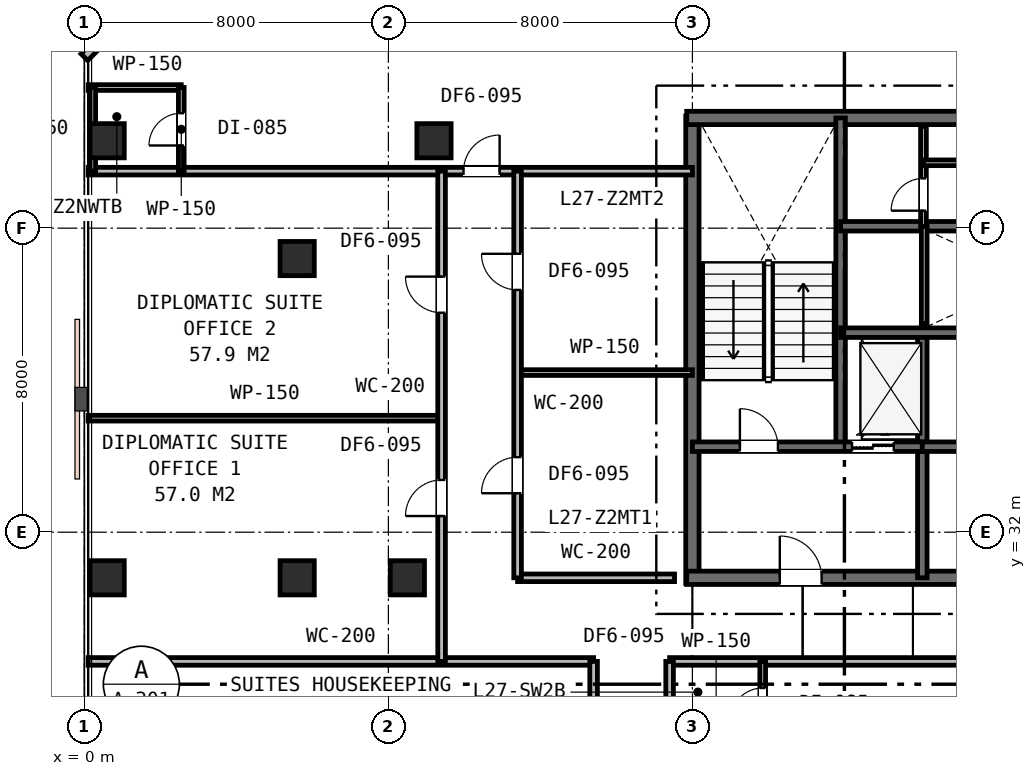
"""IFC4 building model, lengths in metres.
Left out: names, types, materials, properties, quantities, classifications, styles, units other than length and angle.
Written with IfcOpenShell. Run it as: python <this file> out.ifc"""

import sys

from ifc_helpers import new_model, si_unit, direction, frame, frame_2d, origin, origin_2d, place, context, subcontext, project, spatial, rectangle, extrude, element, fill, save


model = new_model("IFC4")
c1 = context("Model", 3, precision=1e-05, world=origin(), true_north=direction((0.0, 1.0)))
c2 = subcontext(c1, "Body", "Model", "MODEL_VIEW")
j1 = project(units=[si_unit("LENGTHUNIT", "METRE"), si_unit("PLANEANGLEUNIT", "RADIAN")], contexts=[c1])
p1 = place(None, origin())
s1 = spatial("IfcSite", under=j1, at=p1, CompositionType="ELEMENT")
p2 = place(p1, origin())
s2 = spatial("IfcBuilding", under=s1, at=p2, CompositionType="ELEMENT")
p3 = place(p2, frame((0.0, 0.0, 108.0)))
s3 = spatial("IfcBuildingStorey", under=s2, at=p3, CompositionType="ELEMENT", Elevation=108.0)
p4 = place(p3, frame((16.0, 30.65, 0.0), z_axis=(0.0, 0.0, 1.0), x_axis=(0.0, 1.0, 0.0)))
e1 = element("IfcWall", 1, at=p4, inside=s3, PredefinedType="SHEAR", context=c2, shape_type="SweptSolid", body=[
    extrude(rectangle(XDim=12.3, YDim=0.35, at=frame_2d((6.15, 0.0))), origin(), (0.0, 0.0, 1.0), 3.6),
])
p5 = place(p3, frame((15.85, 42.9, 0.0), z_axis=(0.0, 0.0, 1.0), x_axis=(1.0, 0.0, 0.0)))
e2 = element("IfcWall", 2, at=p5, inside=s3, PredefinedType="SHEAR", context=c2, shape_type="SweptSolid", body=[
    extrude(rectangle(XDim=24.3, YDim=0.35, at=frame_2d((12.15, 0.0))), origin(), (0.0, 0.0, 1.0), 3.6),
])
p6 = place(p3, frame((15.85, 30.8, 0.0), z_axis=(0.0, 0.0, 1.0), x_axis=(1.0, 0.0, 0.0)))
e3 = element("IfcWall", 3, at=p6, inside=s3, PredefinedType="SHEAR", context=c2, shape_type="SweptSolid", body=[
    extrude(rectangle(XDim=11.2, YDim=0.35, at=frame_2d((5.6, 0.0))), origin(), (0.0, 0.0, 1.0), 3.6),
])
p7 = place(p6, frame((2.45, 0.0, 0.0)))
e4 = element("IfcOpeningElement", 4, at=p7, cuts=e3, PredefinedType="OPENING", context=c2, shape_type="SweptSolid", body=[
    extrude(rectangle(XDim=1.1, YDim=2.15, at=frame_2d((0.55, 1.075))), frame((0.0, 0.185, 0.0), z_axis=(0.0, -1.0, 0.0), x_axis=(1.0, 0.0, 0.0)), (0.0, 0.0, 1.0), 0.37),
])
p8 = place(p3, frame((19.9, 34.25, 0.0), z_axis=(0.0, 0.0, 1.0), x_axis=(0.0, 1.0, 0.0)))
e5 = element("IfcWall", 5, at=p8, inside=s3, PredefinedType="SHEAR", context=c2, shape_type="SweptSolid", body=[
    extrude(rectangle(XDim=8.65, YDim=0.25, at=frame_2d((4.325, 0.0))), origin(), (0.0, 0.0, 1.0), 3.6),
])
p9 = place(p3, frame((22.05, 30.8, 0.0), z_axis=(0.0, 0.0, 1.0), x_axis=(0.0, 1.0, 0.0)))
e6 = element("IfcWall", 6, at=p9, inside=s3, PredefinedType="SHEAR", context=c2, shape_type="SweptSolid", body=[
    extrude(rectangle(XDim=6.45, YDim=0.25, at=frame_2d((3.225, 0.0))), origin(), (0.0, 0.0, 1.0), 3.6),
])
p10 = place(p3, frame((16.0, 34.25, 0.0), z_axis=(0.0, 0.0, 1.0), x_axis=(1.0, 0.0, 0.0)))
e7 = element("IfcWall", 7, at=p10, inside=s3, PredefinedType="SHEAR", context=c2, shape_type="SweptSolid", body=[
    extrude(rectangle(XDim=6.05, YDim=0.25, at=frame_2d((3.025, 0.0))), origin(), (0.0, 0.0, 1.0), 3.6),
])
p11 = place(p10, frame((1.25, 0.0, 0.0)))
e8 = element("IfcOpeningElement", 8, at=p11, cuts=e7, PredefinedType="OPENING", context=c2, shape_type="SweptSolid", body=[
    extrude(rectangle(XDim=1.0, YDim=2.15, at=frame_2d((0.5, 1.075))), frame((0.0, 0.135, 0.0), z_axis=(0.0, -1.0, 0.0), x_axis=(1.0, 0.0, 0.0)), (0.0, 0.0, 1.0), 0.27),
])
p12 = place(p10, frame((4.2, 0.0, 0.0)))
e9 = element("IfcOpeningElement", 9, at=p12, cuts=e7, PredefinedType="OPENING", context=c2, shape_type="SweptSolid", body=[
    extrude(rectangle(XDim=1.1, YDim=2.15, at=frame_2d((0.55, 1.075))), frame((0.0, 0.135, 0.0), z_axis=(0.0, -1.0, 0.0), x_axis=(1.0, 0.0, 0.0)), (0.0, 0.0, 1.0), 0.27),
])
p13 = place(p3, frame((22.05, 34.25, 0.0), z_axis=(0.0, 0.0, 1.0), x_axis=(1.0, 0.0, 0.0)))
e10 = element("IfcWall", 10, at=p13, inside=s3, PredefinedType="SHEAR", context=c2, shape_type="SweptSolid", body=[
    extrude(rectangle(XDim=5.0, YDim=0.25, at=frame_2d((2.5, 0.0))), origin(), (0.0, 0.0, 1.0), 3.6),
])
p14 = place(p13, frame((1.95, 0.0, 0.0)))
e11 = element("IfcOpeningElement", 11, at=p14, cuts=e10, PredefinedType="OPENING", context=c2, shape_type="SweptSolid", body=[
    extrude(rectangle(XDim=1.0, YDim=2.15, at=frame_2d((0.5, 1.075))), frame((0.0, 0.135, 0.0), z_axis=(0.0, -1.0, 0.0), x_axis=(1.0, 0.0, 0.0)), (0.0, 0.0, 1.0), 0.27),
])
p15 = place(p3, frame((19.9, 37.25, 0.0), z_axis=(0.0, 0.0, 1.0), x_axis=(1.0, 0.0, 0.0)))
e12 = element("IfcWall", 12, at=p15, inside=s3, PredefinedType="SHEAR", context=c2, shape_type="SweptSolid", body=[
    extrude(rectangle(XDim=16.2, YDim=0.25, at=frame_2d((8.1, 0.0))), origin(), (0.0, 0.0, 1.0), 3.6),
])
p16 = place(p15, frame((12.55, 0.0, 0.0)))
e13 = element("IfcOpeningElement", 13, at=p16, cuts=e12, PredefinedType="OPENING", context=c2, shape_type="SweptSolid", body=[
    extrude(rectangle(XDim=0.9, YDim=2.15, at=frame_2d((0.45, 1.075))), frame((0.0, 0.135, 0.0), z_axis=(0.0, -1.0, 0.0), x_axis=(1.0, 0.0, 0.0)), (0.0, 0.0, 1.0), 0.27),
])
p17 = place(p3, frame((19.9, 40.05, 0.0), z_axis=(0.0, 0.0, 1.0), x_axis=(1.0, 0.0, 0.0)))
e14 = element("IfcWall", 14, at=p17, inside=s3, PredefinedType="SHEAR", context=c2, shape_type="SweptSolid", body=[
    extrude(rectangle(XDim=12.05, YDim=0.25, at=frame_2d((6.025, 0.0))), origin(), (0.0, 0.0, 1.0), 3.6),
])
for number, where, z_axis, x_axis in (
    (15, (5.6, 30.8, 0.0), (0.0, 0.0, 1.0), (1.0, 0.0, 0.0)),
    (16, (5.6, 39.2, 0.0), (0.0, 0.0, 1.0), (1.0, 0.0, 0.0)),
    (17, (8.5, 30.8, 0.0), (0.0, 0.0, 1.0), (1.0, 0.0, 0.0)),
    (18, (9.2, 42.3, 0.0), (0.0, 0.0, 1.0), (1.0, 0.0, 0.0)),
    (19, (0.6, 30.8, 0.0), (0.0, 0.0, 1.0), (1.0, 0.0, 0.0)),
    (20, (0.6, 42.3, 0.0), (0.0, 0.0, 1.0), (1.0, 0.0, 0.0)),
):
    element("IfcColumn", number, at=place(p3, frame(where, z_axis=z_axis, x_axis=x_axis)), inside=s3, PredefinedType="COLUMN", context=c2, shape_type="SweptSolid", body=[
        extrude(rectangle(XDim=0.9, YDim=0.9, at=origin_2d()), origin(), (0.0, 0.0, 1.0), 3.6),
    ])
p18 = place(p3, frame((3.5, 48.0, 0.0), z_axis=(0.0, 0.0, 1.0), x_axis=(-0.707106781187, -0.707106781187, 0.0)))
e21 = element("IfcWall", 21, at=p18, inside=s3, PredefinedType="STANDARD", context=c2, shape_type="SweptSolid", body=[
    extrude(rectangle(XDim=4.95, YDim=0.25, at=frame_2d((2.475, 0.0))), origin(), (0.0, 0.0, 1.0), 3.33),
])
p19 = place(p18, frame((1.875, 0.0, 0.85)))
e22 = element("IfcOpeningElement", 22, at=p19, cuts=e21, PredefinedType="OPENING", context=c2, shape_type="SweptSolid", body=[
    extrude(rectangle(XDim=1.2, YDim=1.6, at=frame_2d((0.6, 0.8))), frame((0.0, 0.135, 0.0), z_axis=(0.0, -1.0, 0.0), x_axis=(1.0, 0.0, 0.0)), (0.0, 0.0, 1.0), 0.27),
])
p20 = place(p3, frame((22.1, 37.49, 0.0), z_axis=(0.0, 0.0, 1.0), x_axis=(0.0, 1.0, 0.0)))
e23 = element("IfcWall", 23, at=p20, inside=s3, PredefinedType="PLUMBINGWALL", context=c2, shape_type="SweptSolid", body=[
    extrude(rectangle(XDim=2.56, YDim=0.15, at=frame_2d((1.28, 0.0))), origin(), (0.0, 0.0, 1.0), 3.33),
])
p21 = place(p3, frame((22.08, 40.05, 0.0), z_axis=(0.0, 0.0, 1.0), x_axis=(0.0, 1.0, 0.0)))
e24 = element("IfcWall", 24, at=p21, inside=s3, PredefinedType="PARTITIONING", context=c2, shape_type="SweptSolid", body=[
    extrude(rectangle(XDim=2.63, YDim=0.15, at=frame_2d((1.315, 0.0))), origin(), (0.0, 0.0, 1.0), 3.33),
])
p22 = place(p21, frame((0.41, 0.0, 0.0)))
e25 = element("IfcOpeningElement", 25, at=p22, cuts=e24, PredefinedType="OPENING", context=c2, shape_type="SweptSolid", body=[
    extrude(rectangle(XDim=0.85, YDim=2.15, at=frame_2d((0.425, 1.075))), frame((0.0, 0.085, 0.0), z_axis=(0.0, -1.0, 0.0), x_axis=(1.0, 0.0, 0.0)), (0.0, 0.0, 1.0), 0.17),
])
p23 = place(p3, frame((22.08, 41.72, 0.0), z_axis=(0.0, 0.0, 1.0), x_axis=(1.0, 0.0, 0.0)))
e26 = element("IfcWall", 26, at=p23, inside=s3, PredefinedType="PARTITIONING", context=c2, shape_type="SweptSolid", body=[
    extrude(rectangle(XDim=11.97, YDim=0.15, at=frame_2d((5.985, 0.0))), origin(), (0.0, 0.0, 1.0), 3.33),
])
p24 = place(p23, frame((5.535, 0.0, 0.0)))
e27 = element("IfcOpeningElement", 27, at=p24, cuts=e26, PredefinedType="OPENING", context=c2, shape_type="SweptSolid", body=[
    extrude(rectangle(XDim=0.9, YDim=2.15, at=frame_2d((0.45, 1.075))), frame((0.0, 0.085, 0.0), z_axis=(0.0, -1.0, 0.0), x_axis=(1.0, 0.0, 0.0)), (0.0, 0.0, 1.0), 0.17),
])
p25 = place(p3, frame((0.1, 28.6, 0.0), z_axis=(0.0, 0.0, 1.0), x_axis=(1.0, 0.0, 0.0)))
e28 = element("IfcWall", 28, at=p25, inside=s3, PredefinedType="PARTITIONING", context=c2, shape_type="SweptSolid", body=[
    extrude(rectangle(XDim=13.3, YDim=0.2, at=frame_2d((6.65, 0.0))), origin(), (0.0, 0.0, 1.0), 2.87),
])
p26 = place(p3, frame((15.4, 28.6, 0.0), z_axis=(0.0, 0.0, 1.0), x_axis=(1.0, 0.0, 0.0)))
e29 = element("IfcWall", 29, at=p26, inside=s3, PredefinedType="PARTITIONING", context=c2, shape_type="SweptSolid", body=[
    extrude(rectangle(XDim=28.8, YDim=0.2, at=frame_2d((14.4, 0.0))), origin(), (0.0, 0.0, 1.0), 2.87),
])
p27 = place(p26, frame((12.41, 0.0, 0.0)))
e30 = element("IfcOpeningElement", 30, at=p27, cuts=e29, PredefinedType="OPENING", context=c2, shape_type="SweptSolid", body=[
    extrude(rectangle(XDim=0.95, YDim=2.15, at=frame_2d((0.475, 1.075))), frame((0.0, 0.11, 0.0), z_axis=(0.0, -1.0, 0.0), x_axis=(1.0, 0.0, 0.0)), (0.0, 0.0, 1.0), 0.22),
])
p28 = place(p26, frame((22.68, 0.0, 0.0)))
e31 = element("IfcOpeningElement", 31, at=p28, cuts=e29, PredefinedType="OPENING", context=c2, shape_type="SweptSolid", body=[
    extrude(rectangle(XDim=0.95, YDim=2.15, at=frame_2d((0.475, 1.075))), frame((0.0, 0.11, 0.0), z_axis=(0.0, -1.0, 0.0), x_axis=(1.0, 0.0, 0.0)), (0.0, 0.0, 1.0), 0.22),
])
p29 = place(p3, frame((11.4, 30.8, 0.0), z_axis=(0.0, 0.0, 1.0), x_axis=(1.0, 0.0, 0.0)))
e32 = element("IfcWall", 32, at=p29, inside=s3, PredefinedType="PARTITIONING", context=c2, shape_type="SweptSolid", body=[
    extrude(rectangle(XDim=4.13, YDim=0.2, at=frame_2d((2.065, 0.0))), origin(), (0.0, 0.0, 1.0), 2.87),
])
p30 = place(p3, frame((13.4, 10.6, 0.0), z_axis=(0.0, 0.0, 1.0), x_axis=(0.0, 1.0, 0.0)))
e33 = element("IfcWall", 33, at=p30, inside=s3, PredefinedType="PARTITIONING", context=c2, shape_type="SweptSolid", body=[
    extrude(rectangle(XDim=18.0, YDim=0.2, at=frame_2d((9.0, 0.0))), origin(), (0.0, 0.0, 1.0), 2.87),
])
p31 = place(p30, frame((8.425, 0.0, 0.0)))
e34 = element("IfcOpeningElement", 34, at=p31, cuts=e33, PredefinedType="OPENING", context=c2, shape_type="SweptSolid", body=[
    extrude(rectangle(XDim=0.95, YDim=2.15, at=frame_2d((0.475, 1.075))), frame((0.0, 0.11, 0.0), z_axis=(0.0, -1.0, 0.0), x_axis=(1.0, 0.0, 0.0)), (0.0, 0.0, 1.0), 0.22),
])
p32 = place(p30, frame((15.399, 0.0, 0.0)))
e35 = element("IfcOpeningElement", 35, at=p32, cuts=e33, PredefinedType="OPENING", context=c2, shape_type="SweptSolid", body=[
    extrude(rectangle(XDim=0.95, YDim=2.15, at=frame_2d((0.475, 1.075))), frame((0.0, 0.11, 0.0), z_axis=(0.0, -1.0, 0.0), x_axis=(1.0, 0.0, 0.0)), (0.0, 0.0, 1.0), 0.22),
])
p33 = place(p30, frame((3.225, 0.0, 0.0)))
e36 = element("IfcOpeningElement", 36, at=p33, cuts=e33, PredefinedType="OPENING", context=c2, shape_type="SweptSolid", body=[
    extrude(rectangle(XDim=0.95, YDim=2.15, at=frame_2d((0.475, 1.075))), frame((0.0, 0.11, 0.0), z_axis=(0.0, -1.0, 0.0), x_axis=(1.0, 0.0, 0.0)), (0.0, 0.0, 1.0), 0.22),
])
p34 = place(p3, frame((0.1, 41.5, 0.0), z_axis=(0.0, 0.0, 1.0), x_axis=(1.0, 0.0, 0.0)))
e37 = element("IfcWall", 37, at=p34, inside=s3, PredefinedType="PARTITIONING", context=c2, shape_type="SweptSolid", body=[
    extrude(rectangle(XDim=15.9, YDim=0.2, at=frame_2d((7.95, 0.0))), origin(), (0.0, 0.0, 1.0), 2.87),
])
p35 = place(p34, frame((9.877, 0.0, 0.0)))
e38 = element("IfcOpeningElement", 38, at=p35, cuts=e37, PredefinedType="OPENING", context=c2, shape_type="SweptSolid", body=[
    extrude(rectangle(XDim=0.95, YDim=2.15, at=frame_2d((0.475, 1.075))), frame((0.0, 0.11, 0.0), z_axis=(0.0, -1.0, 0.0), x_axis=(1.0, 0.0, 0.0)), (0.0, 0.0, 1.0), 0.22),
])
p36 = place(p3, frame((0.1, 43.7, 0.0), z_axis=(0.0, 0.0, 1.0), x_axis=(1.0, 0.0, 0.0)))
e39 = element("IfcWall", 39, at=p36, inside=s3, PredefinedType="PARTITIONING", context=c2, shape_type="SweptSolid", body=[
    extrude(rectangle(XDim=2.45, YDim=0.15, at=frame_2d((1.225, 0.0))), origin(), (0.0, 0.0, 1.0), 3.33),
])
p37 = place(p3, frame((2.55, 41.5, 0.0), z_axis=(0.0, 0.0, 1.0), x_axis=(0.0, 1.0, 0.0)))
e40 = element("IfcWall", 40, at=p37, inside=s3, PredefinedType="PARTITIONING", context=c2, shape_type="SweptSolid", body=[
    extrude(rectangle(XDim=2.2, YDim=0.15, at=frame_2d((1.1, 0.0))), origin(), (0.0, 0.0, 1.0), 2.87),
])
p38 = place(p37, frame((0.675, 0.0, 0.0)))
e41 = element("IfcOpeningElement", 41, at=p38, cuts=e40, PredefinedType="OPENING", context=c2, shape_type="SweptSolid", body=[
    extrude(rectangle(XDim=0.85, YDim=2.15, at=frame_2d((0.425, 1.075))), frame((0.0, 0.085, 0.0), z_axis=(0.0, -1.0, 0.0), x_axis=(1.0, 0.0, 0.0)), (0.0, 0.0, 1.0), 0.17),
])
p39 = place(p3, frame((0.22, 41.5, 0.0), z_axis=(0.0, 0.0, 1.0), x_axis=(0.0, 1.0, 0.0)))
e42 = element("IfcWall", 42, at=p39, inside=s3, PredefinedType="PARTITIONING", context=c2, shape_type="SweptSolid", body=[
    extrude(rectangle(XDim=2.2, YDim=0.15, at=frame_2d((1.1, 0.0))), origin(), (0.0, 0.0, 1.0), 2.87),
])
p40 = place(p3, frame((0.1, 35.0, 0.0), z_axis=(0.0, 0.0, 1.0), x_axis=(1.0, 0.0, 0.0)))
e43 = element("IfcWall", 43, at=p40, inside=s3, PredefinedType="PARTITIONING", context=c2, shape_type="SweptSolid", body=[
    extrude(rectangle(XDim=9.3, YDim=0.15, at=frame_2d((4.65, 0.0))), origin(), (0.0, 0.0, 1.0), 2.87),
])
p41 = place(p3, frame((11.4, 36.2, 0.0), z_axis=(0.0, 0.0, 1.0), x_axis=(1.0, 0.0, 0.0)))
e44 = element("IfcWall", 44, at=p41, inside=s3, PredefinedType="PARTITIONING", context=c2, shape_type="SweptSolid", body=[
    extrude(rectangle(XDim=4.6, YDim=0.15, at=frame_2d((2.3, 0.0))), origin(), (0.0, 0.0, 1.0), 3.33),
])
p42 = place(p3, frame((9.4, 28.6, 0.0), z_axis=(0.0, 0.0, 1.0), x_axis=(0.0, 1.0, 0.0)))
e45 = element("IfcWall", 45, at=p42, inside=s3, PredefinedType="PARTITIONING", context=c2, shape_type="SweptSolid", body=[
    extrude(rectangle(XDim=12.9, YDim=0.2, at=frame_2d((6.45, 0.0))), origin(), (0.0, 0.0, 1.0), 2.87),
])
p43 = place(p42, frame((3.825, 0.0, 0.0)))
e46 = element("IfcOpeningElement", 46, at=p43, cuts=e45, PredefinedType="OPENING", context=c2, shape_type="SweptSolid", body=[
    extrude(rectangle(XDim=0.95, YDim=2.15, at=frame_2d((0.475, 1.075))), frame((0.0, 0.11, 0.0), z_axis=(0.0, -1.0, 0.0), x_axis=(1.0, 0.0, 0.0)), (0.0, 0.0, 1.0), 0.22),
])
p44 = place(p42, frame((9.175, 0.0, 0.0)))
e47 = element("IfcOpeningElement", 47, at=p44, cuts=e45, PredefinedType="OPENING", context=c2, shape_type="SweptSolid", body=[
    extrude(rectangle(XDim=0.95, YDim=2.15, at=frame_2d((0.475, 1.075))), frame((0.0, 0.11, 0.0), z_axis=(0.0, -1.0, 0.0), x_axis=(1.0, 0.0, 0.0)), (0.0, 0.0, 1.0), 0.22),
])
p45 = place(p3, frame((11.4, 30.8, 0.0), z_axis=(0.0, 0.0, 1.0), x_axis=(0.0, 1.0, 0.0)))
e48 = element("IfcWall", 48, at=p45, inside=s3, PredefinedType="PARTITIONING", context=c2, shape_type="SweptSolid", body=[
    extrude(rectangle(XDim=10.7, YDim=0.2, at=frame_2d((5.35, 0.0))), origin(), (0.0, 0.0, 1.0), 2.87),
])
p46 = place(p45, frame((2.225, 0.0, 0.0)))
e49 = element("IfcOpeningElement", 49, at=p46, cuts=e48, PredefinedType="OPENING", context=c2, shape_type="SweptSolid", body=[
    extrude(rectangle(XDim=0.95, YDim=2.15, at=frame_2d((0.475, 1.075))), frame((0.0, 0.11, 0.0), z_axis=(0.0, -1.0, 0.0), x_axis=(1.0, 0.0, 0.0)), (0.0, 0.0, 1.0), 0.22),
])
p47 = place(p45, frame((7.575, 0.0, 0.0)))
e50 = element("IfcOpeningElement", 50, at=p47, cuts=e48, PredefinedType="OPENING", context=c2, shape_type="SweptSolid", body=[
    extrude(rectangle(XDim=0.95, YDim=2.15, at=frame_2d((0.475, 1.075))), frame((0.0, 0.11, 0.0), z_axis=(0.0, -1.0, 0.0), x_axis=(1.0, 0.0, 0.0)), (0.0, 0.0, 1.0), 0.22),
])
p48 = place(p3, frame((15.4, 10.6, 0.0), z_axis=(0.0, 0.0, 1.0), x_axis=(0.0, 1.0, 0.0)))
e51 = element("IfcWall", 51, at=p48, inside=s3, PredefinedType="PARTITIONING", context=c2, shape_type="SweptSolid", body=[
    extrude(rectangle(XDim=18.0, YDim=0.2, at=frame_2d((9.0, 0.0))), origin(), (0.0, 0.0, 1.0), 2.87),
])
p49 = place(p48, frame((4.24, 0.0, 0.0)))
e52 = element("IfcOpeningElement", 52, at=p49, cuts=e51, PredefinedType="OPENING", context=c2, shape_type="SweptSolid", body=[
    extrude(rectangle(XDim=0.95, YDim=2.15, at=frame_2d((0.475, 1.075))), frame((0.0, 0.11, 0.0), z_axis=(0.0, -1.0, 0.0), x_axis=(1.0, 0.0, 0.0)), (0.0, 0.0, 1.0), 0.22),
])
p50 = place(p48, frame((11.494, 0.0, 0.0)))
e53 = element("IfcOpeningElement", 53, at=p50, cuts=e51, PredefinedType="OPENING", context=c2, shape_type="SweptSolid", body=[
    extrude(rectangle(XDim=0.95, YDim=2.15, at=frame_2d((0.475, 1.075))), frame((0.0, 0.11, 0.0), z_axis=(0.0, -1.0, 0.0), x_axis=(1.0, 0.0, 0.0)), (0.0, 0.0, 1.0), 0.22),
])
p51 = place(p3, frame((17.85, 26.35, 0.0), z_axis=(0.0, 0.0, 1.0), x_axis=(0.0, 1.0, 0.0)))
e54 = element("IfcWall", 54, at=p51, inside=s3, PredefinedType="PARTITIONING", context=c2, shape_type="SweptSolid", body=[
    extrude(rectangle(XDim=2.25, YDim=0.15, at=frame_2d((1.125, 0.0))), origin(), (0.0, 0.0, 1.0), 3.33),
])
p52 = place(p51, frame((0.7, 0.0, 0.0)))
e55 = element("IfcOpeningElement", 55, at=p52, cuts=e54, PredefinedType="OPENING", context=c2, shape_type="SweptSolid", body=[
    extrude(rectangle(XDim=0.85, YDim=2.15, at=frame_2d((0.425, 1.075))), frame((0.0, 0.085, 0.0), z_axis=(0.0, -1.0, 0.0), x_axis=(1.0, 0.0, 0.0)), (0.0, 0.0, 1.0), 0.17),
])
p53 = place(p11, origin())
e56 = element("IfcDoor", 56, at=p53, inside=s3, OperationType="SINGLE_SWING_LEFT", PredefinedType="DOOR", context=c2, shape_type="SweptSolid", body=[
    extrude(rectangle(XDim=1.0, YDim=2.15, at=frame_2d((0.5, 1.075))), frame((0.0, 0.025, 0.0), z_axis=(0.0, -1.0, 0.0), x_axis=(1.0, 0.0, 0.0)), (0.0, 0.0, 1.0), 0.05),
])
fill(e8, e56)
p54 = place(p7, origin())
e57 = element("IfcDoor", 57, at=p54, inside=s3, OperationType="SINGLE_SWING_LEFT", PredefinedType="DOOR", context=c2, shape_type="SweptSolid", body=[
    extrude(rectangle(XDim=1.1, YDim=2.15, at=frame_2d((0.55, 1.075))), frame((0.0, 0.025, 0.0), z_axis=(0.0, -1.0, 0.0), x_axis=(1.0, 0.0, 0.0)), (0.0, 0.0, 1.0), 0.05),
])
fill(e4, e57)
p55 = place(p22, origin())
e58 = element("IfcDoor", 58, at=p55, inside=s3, OperationType="SINGLE_SWING_LEFT", PredefinedType="DOOR", context=c2, shape_type="SweptSolid", body=[
    extrude(rectangle(XDim=0.85, YDim=2.15, at=frame_2d((0.425, 1.075))), frame((0.0, 0.025, 0.0), z_axis=(0.0, -1.0, 0.0), x_axis=(1.0, 0.0, 0.0)), (0.0, 0.0, 1.0), 0.05),
])
fill(e25, e58)
p56 = place(p35, origin())
e59 = element("IfcDoor", 59, at=p56, inside=s3, OperationType="SINGLE_SWING_RIGHT", PredefinedType="DOOR", context=c2, shape_type="SweptSolid", body=[
    extrude(rectangle(XDim=0.95, YDim=2.15, at=frame_2d((0.475, 1.075))), frame((0.0, 0.025, 0.0), z_axis=(0.0, -1.0, 0.0), x_axis=(1.0, 0.0, 0.0)), (0.0, 0.0, 1.0), 0.05),
])
fill(e38, e59)
p57 = place(p38, origin())
e60 = element("IfcDoor", 60, at=p57, inside=s3, OperationType="SINGLE_SWING_LEFT", PredefinedType="DOOR", context=c2, shape_type="SweptSolid", body=[
    extrude(rectangle(XDim=0.85, YDim=2.15, at=frame_2d((0.425, 1.075))), frame((0.0, 0.025, 0.0), z_axis=(0.0, -1.0, 0.0), x_axis=(1.0, 0.0, 0.0)), (0.0, 0.0, 1.0), 0.05),
])
fill(e41, e60)
p58 = place(p43, origin())
e61 = element("IfcDoor", 61, at=p58, inside=s3, OperationType="SINGLE_SWING_LEFT", PredefinedType="DOOR", context=c2, shape_type="SweptSolid", body=[
    extrude(rectangle(XDim=0.95, YDim=2.15, at=frame_2d((0.475, 1.075))), frame((0.0, 0.025, 0.0), z_axis=(0.0, -1.0, 0.0), x_axis=(1.0, 0.0, 0.0)), (0.0, 0.0, 1.0), 0.05),
])
fill(e46, e61)
p59 = place(p44, origin())
e62 = element("IfcDoor", 62, at=p59, inside=s3, OperationType="SINGLE_SWING_RIGHT", PredefinedType="DOOR", context=c2, shape_type="SweptSolid", body=[
    extrude(rectangle(XDim=0.95, YDim=2.15, at=frame_2d((0.475, 1.075))), frame((0.0, 0.025, 0.0), z_axis=(0.0, -1.0, 0.0), x_axis=(1.0, 0.0, 0.0)), (0.0, 0.0, 1.0), 0.05),
])
fill(e47, e62)
p60 = place(p46, origin())
e63 = element("IfcDoor", 63, at=p60, inside=s3, OperationType="SINGLE_SWING_LEFT", PredefinedType="DOOR", context=c2, shape_type="SweptSolid", body=[
    extrude(rectangle(XDim=0.95, YDim=2.15, at=frame_2d((0.475, 1.075))), frame((0.0, 0.025, 0.0), z_axis=(0.0, -1.0, 0.0), x_axis=(1.0, 0.0, 0.0)), (0.0, 0.0, 1.0), 0.05),
])
fill(e49, e63)
p61 = place(p47, origin())
e64 = element("IfcDoor", 64, at=p61, inside=s3, OperationType="SINGLE_SWING_RIGHT", PredefinedType="DOOR", context=c2, shape_type="SweptSolid", body=[
    extrude(rectangle(XDim=0.95, YDim=2.15, at=frame_2d((0.475, 1.075))), frame((0.0, 0.025, 0.0), z_axis=(0.0, -1.0, 0.0), x_axis=(1.0, 0.0, 0.0)), (0.0, 0.0, 1.0), 0.05),
])
fill(e50, e64)
p62 = place(p52, origin())
e65 = element("IfcDoor", 65, at=p62, inside=s3, OperationType="SINGLE_SWING_LEFT", PredefinedType="DOOR", context=c2, shape_type="SweptSolid", body=[
    extrude(rectangle(XDim=0.85, YDim=2.15, at=frame_2d((0.425, 1.075))), frame((0.0, 0.025, 0.0), z_axis=(0.0, -1.0, 0.0), x_axis=(1.0, 0.0, 0.0)), (0.0, 0.0, 1.0), 0.05),
])
fill(e55, e65)
p63 = place(p12, origin())
e66 = element("IfcDoor", 66, at=p63, inside=s3, OperationType="DOUBLE_DOOR_SLIDING", PredefinedType="DOOR", context=c2, shape_type="SweptSolid", body=[
    extrude(rectangle(XDim=1.1, YDim=2.15, at=frame_2d((0.55, 1.075))), frame((0.0, 0.025, 0.0), z_axis=(0.0, -1.0, 0.0), x_axis=(1.0, 0.0, 0.0)), (0.0, 0.0, 1.0), 0.05),
])
fill(e9, e66)
save(model, sys.argv[1])
